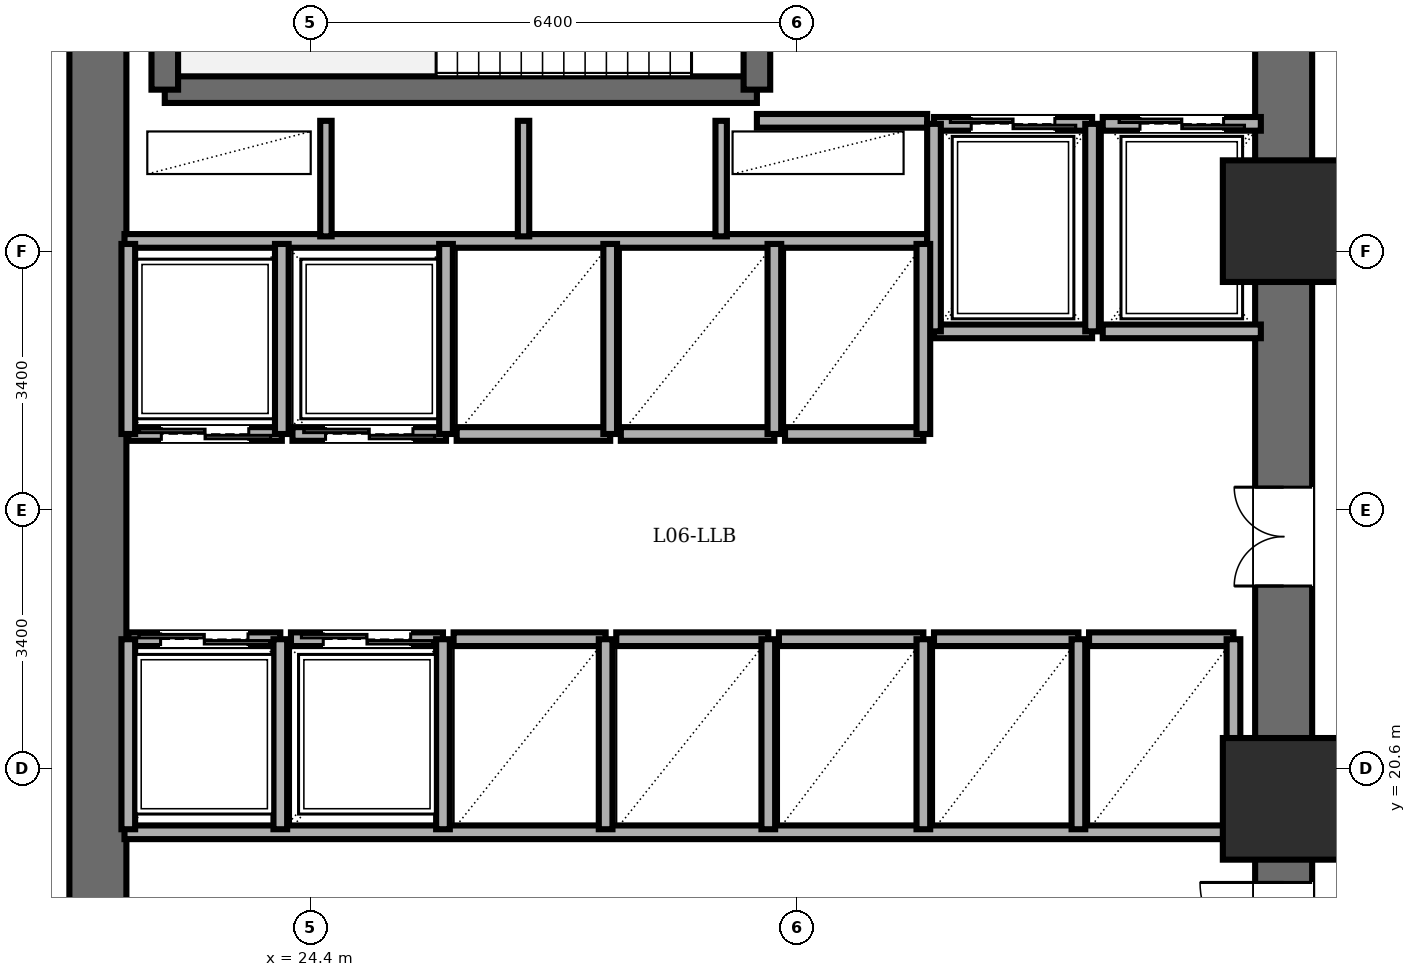
"""IFC4 building model, lengths in metres.
Left out: names, types, materials, properties, quantities, classifications, styles, units other than length and angle.
Written with IfcOpenShell. Run it as: python <this file> out.ifc"""

import sys

from ifc_helpers import new_model, si_unit, direction, frame, frame_2d, origin, origin_2d, place, context, subcontext, project, spatial, rectangle, extrude, element, fill, save


model = new_model("IFC4")
c1 = context("Model", 3, precision=1e-05, world=origin(), true_north=direction((0.0, 1.0)))
c2 = subcontext(c1, "Body", "Model", "MODEL_VIEW")
j1 = project(units=[si_unit("LENGTHUNIT", "METRE"), si_unit("PLANEANGLEUNIT", "RADIAN")], contexts=[c1])
p1 = place(None, origin())
s1 = spatial("IfcSite", under=j1, at=p1, CompositionType="ELEMENT")
p2 = place(p1, origin())
s2 = spatial("IfcBuilding", under=s1, at=p2, CompositionType="ELEMENT")
p3 = place(p2, frame((0.0, 0.0, 24.0)))
s3 = spatial("IfcBuildingStorey", under=s2, at=p3, CompositionType="ELEMENT", Elevation=24.0)
for number, where, z_axis, x_axis in (
    (1, (37.2, 20.2, 0.0), (0.0, 0.0, 1.0), (1.0, 0.0, 0.0)),
    (2, (37.2, 27.8, 0.0), (0.0, 0.0, 1.0), (1.0, 0.0, 0.0)),
):
    element("IfcColumn", number, at=place(p3, frame(where, z_axis=z_axis, x_axis=x_axis)), inside=s3, PredefinedType="COLUMN", context=c2, shape_type="SweptSolid", body=[
        extrude(rectangle(XDim=1.6, YDim=1.6, at=origin_2d()), origin(), (0.0, 0.0, 1.0), 4.8),
    ])
p4 = place(p3, frame((21.6, 14.4, 0.0), z_axis=(0.0, 0.0, 1.0), x_axis=(0.0, 1.0, 0.0)))
e3 = element("IfcWall", 3, at=p4, inside=s3, PredefinedType="SHEAR", context=c2, shape_type="SweptSolid", body=[
    extrude(rectangle(XDim=19.2, YDim=0.75, at=frame_2d((9.6, 0.0))), origin(), (0.0, 0.0, 1.0), 4.6),
])
p5 = place(p3, frame((37.2, 14.4, 0.0), z_axis=(0.0, 0.0, 1.0), x_axis=(0.0, 1.0, 0.0)))
e4 = element("IfcWall", 4, at=p5, inside=s3, PredefinedType="SHEAR", context=c2, shape_type="SweptSolid", body=[
    extrude(rectangle(XDim=19.2, YDim=0.75, at=frame_2d((9.6, 0.0))), origin(), (0.0, 0.0, 1.0), 4.6),
])
p6 = place(p5, frame((15.8, 0.0, 0.0)))
e5 = element("IfcOpeningElement", 5, at=p6, cuts=e4, PredefinedType="OPENING", context=c2, shape_type="SweptSolid", body=[
    extrude(rectangle(XDim=1.15, YDim=2.15, at=frame_2d((0.575, 1.075))), frame((0.0, 0.385, 0.0), z_axis=(0.0, -1.0, 0.0), x_axis=(1.0, 0.0, 0.0)), (0.0, 0.0, 1.0), 0.77),
])
p7 = place(p5, frame((3.6, 0.0, 0.0)))
e6 = element("IfcOpeningElement", 6, at=p7, cuts=e4, PredefinedType="OPENING", context=c2, shape_type="SweptSolid", body=[
    extrude(rectangle(XDim=1.1, YDim=2.15, at=frame_2d((0.55, 1.075))), frame((0.0, 0.385, 0.0), z_axis=(0.0, -1.0, 0.0), x_axis=(1.0, 0.0, 0.0)), (0.0, 0.0, 1.0), 0.77),
])
p8 = place(p5, frame((8.6, 0.0, 0.0)))
e7 = element("IfcOpeningElement", 7, at=p8, cuts=e4, PredefinedType="OPENING", context=c2, shape_type="SweptSolid", body=[
    extrude(rectangle(XDim=1.3, YDim=2.2, at=frame_2d((0.65, 1.1))), frame((0.0, 0.385, 0.0), z_axis=(0.0, -1.0, 0.0), x_axis=(1.0, 0.0, 0.0)), (0.0, 0.0, 1.0), 0.77),
])
p9 = place(p3, frame((22.48, 29.53, 0.0), z_axis=(0.0, 0.0, 1.0), x_axis=(1.0, 0.0, 0.0)))
e8 = element("IfcWall", 8, at=p9, inside=s3, PredefinedType="SOLIDWALL", context=c2, shape_type="SweptSolid", body=[
    extrude(rectangle(XDim=7.79, YDim=0.35, at=frame_2d((3.895, 0.0))), origin(), (0.0, 0.0, 1.0), 4.6),
])
p10 = place(p3, frame((22.48, 29.53, 0.0), z_axis=(0.0, 0.0, 1.0), x_axis=(0.0, 1.0, 0.0)))
e9 = element("IfcWall", 9, at=p10, inside=s3, PredefinedType="SOLIDWALL", context=c2, shape_type="SweptSolid", body=[
    extrude(rectangle(XDim=3.58, YDim=0.35, at=frame_2d((1.79, 0.0))), origin(), (0.0, 0.0, 1.0), 4.6),
])
p11 = place(p3, frame((30.27, 29.53, 0.0), z_axis=(0.0, 0.0, 1.0), x_axis=(0.0, 1.0, 0.0)))
e10 = element("IfcWall", 10, at=p11, inside=s3, PredefinedType="SOLIDWALL", context=c2, shape_type="SweptSolid", body=[
    extrude(rectangle(XDim=3.58, YDim=0.35, at=frame_2d((1.79, 0.0))), origin(), (0.0, 0.0, 1.0), 4.6),
])
p12 = place(p11, frame((1.25, 0.0, 0.0)))
e11 = element("IfcOpeningElement", 11, at=p12, cuts=e10, PredefinedType="OPENING", context=c2, shape_type="SweptSolid", body=[
    extrude(rectangle(XDim=1.1, YDim=2.15, at=frame_2d((0.55, 1.075))), frame((0.0, 0.185, 0.0), z_axis=(0.0, -1.0, 0.0), x_axis=(1.0, 0.0, 0.0)), (0.0, 0.0, 1.0), 0.37),
])
p13 = place(p3, frame((30.27, 29.12, 0.0), z_axis=(0.0, 0.0, 1.0), x_axis=(1.0, 0.0, 0.0)))
e12 = element("IfcWall", 12, at=p13, inside=s3, PredefinedType="PARTITIONING", context=c2, shape_type="SweptSolid", body=[
    extrude(rectangle(XDim=2.24, YDim=0.18, at=frame_2d((1.12, 0.0))), origin(), (0.0, 0.0, 1.0), 4.6),
])
p14 = place(p3, frame((21.95, 27.54, 0.0), z_axis=(0.0, 0.0, 1.0), x_axis=(1.0, 0.0, 0.0)))
e13 = element("IfcWall", 13, at=p14, inside=s3, PredefinedType="PARTITIONING", context=c2, shape_type="SweptSolid", body=[
    extrude(rectangle(XDim=10.56, YDim=0.18, at=frame_2d((5.28, 0.0))), origin(), (0.0, 0.0, 1.0), 4.6),
])
for number, where, z_axis, x_axis in (
    (14, (24.6, 27.6, 0.0), (0.0, 0.0, 1.0), (0.0, 1.0, 0.0)),
    (15, (27.2, 27.6, 0.0), (0.0, 0.0, 1.0), (0.0, 1.0, 0.0)),
    (16, (29.8, 27.6, 0.0), (0.0, 0.0, 1.0), (0.0, 1.0, 0.0)),
):
    element("IfcWall", number, at=place(p3, frame(where, z_axis=z_axis, x_axis=x_axis)), inside=s3, PredefinedType="PARTITIONING", context=c2, shape_type="SweptSolid", body=[
        extrude(rectangle(XDim=1.52, YDim=0.15, at=frame_2d((0.76, 0.0))), origin(), (0.0, 0.0, 1.0), 4.6),
    ])
p15 = place(p3, frame((21.95, 19.76, 0.0), z_axis=(0.0, 0.0, 1.0), x_axis=(1.0, 0.0, 0.0)))
e17 = element("IfcWall", 17, at=p15, inside=s3, PredefinedType="PARTITIONING", context=c2, shape_type="SweptSolid", body=[
    extrude(rectangle(XDim=14.87, YDim=0.18, at=frame_2d((7.435, 0.0))), origin(), (0.0, 0.0, 1.0), 4.6),
])
p16 = place(p3, frame((32.6, 29.08, 0.0), z_axis=(0.0, 0.0, 1.0), x_axis=(1.0, 0.0, 0.0)))
e18 = element("IfcWall", 18, at=p16, inside=s3, PredefinedType="PARTITIONING", context=c2, shape_type="SweptSolid", body=[
    extrude(rectangle(XDim=2.08, YDim=0.18, at=frame_2d((1.04, 0.0))), origin(), (0.0, 0.0, 1.0), 4.6),
])
p17 = place(p16, frame((0.49, 0.0, 0.0)))
e19 = element("IfcOpeningElement", 19, at=p17, cuts=e18, PredefinedType="OPENING", context=c2, shape_type="SweptSolid", body=[
    extrude(rectangle(XDim=1.1, YDim=2.2, at=frame_2d((0.55, 1.1))), frame((0.0, 0.1, 0.0), z_axis=(0.0, -1.0, 0.0), x_axis=(1.0, 0.0, 0.0)), (0.0, 0.0, 1.0), 0.2),
])
p18 = place(p3, frame((34.68, 26.35, 0.0), z_axis=(0.0, 0.0, 1.0), x_axis=(-1.0, 0.0, 0.0)))
e20 = element("IfcWall", 20, at=p18, inside=s3, PredefinedType="PARTITIONING", context=c2, shape_type="SweptSolid", body=[
    extrude(rectangle(XDim=2.08, YDim=0.18, at=frame_2d((1.04, 0.0))), origin(), (0.0, 0.0, 1.0), 4.6),
])
for number, where, z_axis, x_axis in (
    (21, (34.68, 26.35, 0.0), (0.0, 0.0, 1.0), (0.0, 1.0, 0.0)),
    (22, (32.6, 29.08, 0.0), (0.0, 0.0, 1.0), (0.0, -1.0, 0.0)),
):
    element("IfcWall", number, at=place(p3, frame(where, z_axis=z_axis, x_axis=x_axis)), inside=s3, PredefinedType="PARTITIONING", context=c2, shape_type="SweptSolid", body=[
        extrude(rectangle(XDim=2.73, YDim=0.18, at=frame_2d((1.365, 0.0))), origin(), (0.0, 0.0, 1.0), 4.6),
    ])
p19 = place(p3, frame((34.82, 29.08, 0.0), z_axis=(0.0, 0.0, 1.0), x_axis=(1.0, 0.0, 0.0)))
e23 = element("IfcWall", 23, at=p19, inside=s3, PredefinedType="PARTITIONING", context=c2, shape_type="SweptSolid", body=[
    extrude(rectangle(XDim=2.08, YDim=0.18, at=frame_2d((1.04, 0.0))), origin(), (0.0, 0.0, 1.0), 4.6),
])
p20 = place(p19, frame((0.49, 0.0, 0.0)))
e24 = element("IfcOpeningElement", 24, at=p20, cuts=e23, PredefinedType="OPENING", context=c2, shape_type="SweptSolid", body=[
    extrude(rectangle(XDim=1.1, YDim=2.2, at=frame_2d((0.55, 1.1))), frame((0.0, 0.1, 0.0), z_axis=(0.0, -1.0, 0.0), x_axis=(1.0, 0.0, 0.0)), (0.0, 0.0, 1.0), 0.2),
])
p21 = place(p3, frame((36.9, 26.35, 0.0), z_axis=(0.0, 0.0, 1.0), x_axis=(-1.0, 0.0, 0.0)))
e25 = element("IfcWall", 25, at=p21, inside=s3, PredefinedType="PARTITIONING", context=c2, shape_type="SweptSolid", body=[
    extrude(rectangle(XDim=2.08, YDim=0.18, at=frame_2d((1.04, 0.0))), origin(), (0.0, 0.0, 1.0), 4.6),
])
p22 = place(p3, frame((24.02, 25.0, 0.0), z_axis=(0.0, 0.0, 1.0), x_axis=(-1.0, 0.0, 0.0)))
e26 = element("IfcWall", 26, at=p22, inside=s3, PredefinedType="PARTITIONING", context=c2, shape_type="SweptSolid", body=[
    extrude(rectangle(XDim=2.02, YDim=0.18, at=frame_2d((1.01, 0.0))), origin(), (0.0, 0.0, 1.0), 4.6),
])
p23 = place(p22, frame((0.435, 0.0, 0.0)))
e27 = element("IfcOpeningElement", 27, at=p23, cuts=e26, PredefinedType="OPENING", context=c2, shape_type="SweptSolid", body=[
    extrude(rectangle(XDim=1.15, YDim=2.2, at=frame_2d((0.575, 1.1))), frame((0.0, 0.1, 0.0), z_axis=(0.0, -1.0, 0.0), x_axis=(1.0, 0.0, 0.0)), (0.0, 0.0, 1.0), 0.2),
])
for number, where, z_axis, x_axis in (
    (28, (24.02, 25.0, 0.0), (0.0, 0.0, 1.0), (0.0, 1.0, 0.0)),
    (29, (22.0, 27.5, 0.0), (0.0, 0.0, 1.0), (0.0, -1.0, 0.0)),
):
    element("IfcWall", number, at=place(p3, frame(where, z_axis=z_axis, x_axis=x_axis)), inside=s3, PredefinedType="PARTITIONING", context=c2, shape_type="SweptSolid", body=[
        extrude(rectangle(XDim=2.5, YDim=0.18, at=frame_2d((1.25, 0.0))), origin(), (0.0, 0.0, 1.0), 4.6),
    ])
p24 = place(p3, frame((26.18, 25.0, 0.0), z_axis=(0.0, 0.0, 1.0), x_axis=(-1.0, 0.0, 0.0)))
e30 = element("IfcWall", 30, at=p24, inside=s3, PredefinedType="PARTITIONING", context=c2, shape_type="SweptSolid", body=[
    extrude(rectangle(XDim=2.02, YDim=0.18, at=frame_2d((1.01, 0.0))), origin(), (0.0, 0.0, 1.0), 4.6),
])
p25 = place(p24, frame((0.435, 0.0, 0.0)))
e31 = element("IfcOpeningElement", 31, at=p25, cuts=e30, PredefinedType="OPENING", context=c2, shape_type="SweptSolid", body=[
    extrude(rectangle(XDim=1.15, YDim=2.2, at=frame_2d((0.575, 1.1))), frame((0.0, 0.1, 0.0), z_axis=(0.0, -1.0, 0.0), x_axis=(1.0, 0.0, 0.0)), (0.0, 0.0, 1.0), 0.2),
])
p26 = place(p3, frame((26.18, 25.0, 0.0), z_axis=(0.0, 0.0, 1.0), x_axis=(0.0, 1.0, 0.0)))
e32 = element("IfcWall", 32, at=p26, inside=s3, PredefinedType="PARTITIONING", context=c2, shape_type="SweptSolid", body=[
    extrude(rectangle(XDim=2.5, YDim=0.18, at=frame_2d((1.25, 0.0))), origin(), (0.0, 0.0, 1.0), 4.6),
])
p27 = place(p3, frame((22.0, 22.3, 0.0), z_axis=(0.0, 0.0, 1.0), x_axis=(1.0, 0.0, 0.0)))
e33 = element("IfcWall", 33, at=p27, inside=s3, PredefinedType="PARTITIONING", context=c2, shape_type="SweptSolid", body=[
    extrude(rectangle(XDim=2.0, YDim=0.18, at=frame_2d((1.0, 0.0))), origin(), (0.0, 0.0, 1.0), 4.6),
])
p28 = place(p27, frame((0.425, 0.0, 0.0)))
e34 = element("IfcOpeningElement", 34, at=p28, cuts=e33, PredefinedType="OPENING", context=c2, shape_type="SweptSolid", body=[
    extrude(rectangle(XDim=1.15, YDim=2.2, at=frame_2d((0.575, 1.1))), frame((0.0, 0.1, 0.0), z_axis=(0.0, -1.0, 0.0), x_axis=(1.0, 0.0, 0.0)), (0.0, 0.0, 1.0), 0.2),
])
for number, where, z_axis, x_axis in (
    (35, (24.0, 19.8, 0.0), (0.0, 0.0, 1.0), (0.0, 1.0, 0.0)),
    (36, (22.0, 22.3, 0.0), (0.0, 0.0, 1.0), (0.0, -1.0, 0.0)),
):
    element("IfcWall", number, at=place(p3, frame(where, z_axis=z_axis, x_axis=x_axis)), inside=s3, PredefinedType="PARTITIONING", context=c2, shape_type="SweptSolid", body=[
        extrude(rectangle(XDim=2.5, YDim=0.18, at=frame_2d((1.25, 0.0))), origin(), (0.0, 0.0, 1.0), 4.6),
    ])
p29 = place(p3, frame((24.14, 22.3, 0.0), z_axis=(0.0, 0.0, 1.0), x_axis=(1.0, 0.0, 0.0)))
e37 = element("IfcWall", 37, at=p29, inside=s3, PredefinedType="PARTITIONING", context=c2, shape_type="SweptSolid", body=[
    extrude(rectangle(XDim=2.0, YDim=0.18, at=frame_2d((1.0, 0.0))), origin(), (0.0, 0.0, 1.0), 4.6),
])
p30 = place(p29, frame((0.425, 0.0, 0.0)))
e38 = element("IfcOpeningElement", 38, at=p30, cuts=e37, PredefinedType="OPENING", context=c2, shape_type="SweptSolid", body=[
    extrude(rectangle(XDim=1.15, YDim=2.2, at=frame_2d((0.575, 1.1))), frame((0.0, 0.1, 0.0), z_axis=(0.0, -1.0, 0.0), x_axis=(1.0, 0.0, 0.0)), (0.0, 0.0, 1.0), 0.2),
])
p31 = place(p3, frame((26.14, 19.8, 0.0), z_axis=(0.0, 0.0, 1.0), x_axis=(0.0, 1.0, 0.0)))
e39 = element("IfcWall", 39, at=p31, inside=s3, PredefinedType="PARTITIONING", context=c2, shape_type="SweptSolid", body=[
    extrude(rectangle(XDim=2.5, YDim=0.18, at=frame_2d((1.25, 0.0))), origin(), (0.0, 0.0, 1.0), 4.6),
])
p32 = place(p3, frame((28.34, 25.0, 0.0), z_axis=(0.0, 0.0, 1.0), x_axis=(-1.0, 0.0, 0.0)))
e40 = element("IfcWall", 40, at=p32, inside=s3, PredefinedType="PARTITIONING", context=c2, shape_type="SweptSolid", body=[
    extrude(rectangle(XDim=2.02, YDim=0.18, at=frame_2d((1.01, 0.0))), origin(), (0.0, 0.0, 1.0), 4.6),
])
p33 = place(p3, frame((28.34, 25.0, 0.0), z_axis=(0.0, 0.0, 1.0), x_axis=(0.0, 1.0, 0.0)))
e41 = element("IfcWall", 41, at=p33, inside=s3, PredefinedType="PARTITIONING", context=c2, shape_type="SweptSolid", body=[
    extrude(rectangle(XDim=2.5, YDim=0.18, at=frame_2d((1.25, 0.0))), origin(), (0.0, 0.0, 1.0), 4.6),
])
p34 = place(p3, frame((30.5, 25.0, 0.0), z_axis=(0.0, 0.0, 1.0), x_axis=(-1.0, 0.0, 0.0)))
e42 = element("IfcWall", 42, at=p34, inside=s3, PredefinedType="PARTITIONING", context=c2, shape_type="SweptSolid", body=[
    extrude(rectangle(XDim=2.02, YDim=0.18, at=frame_2d((1.01, 0.0))), origin(), (0.0, 0.0, 1.0), 4.6),
])
p35 = place(p3, frame((30.5, 25.0, 0.0), z_axis=(0.0, 0.0, 1.0), x_axis=(0.0, 1.0, 0.0)))
e43 = element("IfcWall", 43, at=p35, inside=s3, PredefinedType="PARTITIONING", context=c2, shape_type="SweptSolid", body=[
    extrude(rectangle(XDim=2.5, YDim=0.18, at=frame_2d((1.25, 0.0))), origin(), (0.0, 0.0, 1.0), 4.6),
])
p36 = place(p3, frame((26.28, 22.3, 0.0), z_axis=(0.0, 0.0, 1.0), x_axis=(1.0, 0.0, 0.0)))
e44 = element("IfcWall", 44, at=p36, inside=s3, PredefinedType="PARTITIONING", context=c2, shape_type="SweptSolid", body=[
    extrude(rectangle(XDim=2.0, YDim=0.18, at=frame_2d((1.0, 0.0))), origin(), (0.0, 0.0, 1.0), 4.6),
])
p37 = place(p3, frame((28.28, 19.8, 0.0), z_axis=(0.0, 0.0, 1.0), x_axis=(0.0, 1.0, 0.0)))
e45 = element("IfcWall", 45, at=p37, inside=s3, PredefinedType="PARTITIONING", context=c2, shape_type="SweptSolid", body=[
    extrude(rectangle(XDim=2.5, YDim=0.18, at=frame_2d((1.25, 0.0))), origin(), (0.0, 0.0, 1.0), 4.6),
])
p38 = place(p3, frame((28.42, 22.3, 0.0), z_axis=(0.0, 0.0, 1.0), x_axis=(1.0, 0.0, 0.0)))
e46 = element("IfcWall", 46, at=p38, inside=s3, PredefinedType="PARTITIONING", context=c2, shape_type="SweptSolid", body=[
    extrude(rectangle(XDim=2.0, YDim=0.18, at=frame_2d((1.0, 0.0))), origin(), (0.0, 0.0, 1.0), 4.6),
])
p39 = place(p3, frame((30.42, 19.8, 0.0), z_axis=(0.0, 0.0, 1.0), x_axis=(0.0, 1.0, 0.0)))
e47 = element("IfcWall", 47, at=p39, inside=s3, PredefinedType="PARTITIONING", context=c2, shape_type="SweptSolid", body=[
    extrude(rectangle(XDim=2.5, YDim=0.18, at=frame_2d((1.25, 0.0))), origin(), (0.0, 0.0, 1.0), 4.6),
])
p40 = place(p3, frame((32.46, 25.0, 0.0), z_axis=(0.0, 0.0, 1.0), x_axis=(-1.0, 0.0, 0.0)))
e48 = element("IfcWall", 48, at=p40, inside=s3, PredefinedType="PARTITIONING", context=c2, shape_type="SweptSolid", body=[
    extrude(rectangle(XDim=1.82, YDim=0.18, at=frame_2d((0.91, 0.0))), origin(), (0.0, 0.0, 1.0), 4.6),
])
p41 = place(p3, frame((32.46, 25.0, 0.0), z_axis=(0.0, 0.0, 1.0), x_axis=(0.0, 1.0, 0.0)))
e49 = element("IfcWall", 49, at=p41, inside=s3, PredefinedType="PARTITIONING", context=c2, shape_type="SweptSolid", body=[
    extrude(rectangle(XDim=2.5, YDim=0.18, at=frame_2d((1.25, 0.0))), origin(), (0.0, 0.0, 1.0), 4.6),
])
p42 = place(p3, frame((30.56, 22.3, 0.0), z_axis=(0.0, 0.0, 1.0), x_axis=(1.0, 0.0, 0.0)))
e50 = element("IfcWall", 50, at=p42, inside=s3, PredefinedType="PARTITIONING", context=c2, shape_type="SweptSolid", body=[
    extrude(rectangle(XDim=1.9, YDim=0.18, at=frame_2d((0.95, 0.0))), origin(), (0.0, 0.0, 1.0), 4.6),
])
p43 = place(p3, frame((32.46, 19.8, 0.0), z_axis=(0.0, 0.0, 1.0), x_axis=(0.0, 1.0, 0.0)))
e51 = element("IfcWall", 51, at=p43, inside=s3, PredefinedType="PARTITIONING", context=c2, shape_type="SweptSolid", body=[
    extrude(rectangle(XDim=2.5, YDim=0.18, at=frame_2d((1.25, 0.0))), origin(), (0.0, 0.0, 1.0), 4.6),
])
p44 = place(p3, frame((32.6, 22.3, 0.0), z_axis=(0.0, 0.0, 1.0), x_axis=(1.0, 0.0, 0.0)))
e52 = element("IfcWall", 52, at=p44, inside=s3, PredefinedType="PARTITIONING", context=c2, shape_type="SweptSolid", body=[
    extrude(rectangle(XDim=1.9, YDim=0.18, at=frame_2d((0.95, 0.0))), origin(), (0.0, 0.0, 1.0), 4.6),
])
p45 = place(p3, frame((34.5, 19.8, 0.0), z_axis=(0.0, 0.0, 1.0), x_axis=(0.0, 1.0, 0.0)))
e53 = element("IfcWall", 53, at=p45, inside=s3, PredefinedType="PARTITIONING", context=c2, shape_type="SweptSolid", body=[
    extrude(rectangle(XDim=2.5, YDim=0.18, at=frame_2d((1.25, 0.0))), origin(), (0.0, 0.0, 1.0), 4.6),
])
p46 = place(p3, frame((34.64, 22.3, 0.0), z_axis=(0.0, 0.0, 1.0), x_axis=(1.0, 0.0, 0.0)))
e54 = element("IfcWall", 54, at=p46, inside=s3, PredefinedType="PARTITIONING", context=c2, shape_type="SweptSolid", body=[
    extrude(rectangle(XDim=1.9, YDim=0.18, at=frame_2d((0.95, 0.0))), origin(), (0.0, 0.0, 1.0), 4.6),
])
p47 = place(p3, frame((36.54, 19.8, 0.0), z_axis=(0.0, 0.0, 1.0), x_axis=(0.0, 1.0, 0.0)))
e55 = element("IfcWall", 55, at=p47, inside=s3, PredefinedType="PARTITIONING", context=c2, shape_type="SweptSolid", body=[
    extrude(rectangle(XDim=2.5, YDim=0.18, at=frame_2d((1.25, 0.0))), origin(), (0.0, 0.0, 1.0), 4.6),
])
p48 = place(p7, origin())
e56 = element("IfcDoor", 56, at=p48, inside=s3, OperationType="SINGLE_SWING_RIGHT", PredefinedType="DOOR", context=c2, shape_type="SweptSolid", body=[
    extrude(rectangle(XDim=1.1, YDim=2.15, at=frame_2d((0.55, 1.075))), frame((0.0, 0.025, 0.0), z_axis=(0.0, -1.0, 0.0), x_axis=(1.0, 0.0, 0.0)), (0.0, 0.0, 1.0), 0.05),
])
fill(e6, e56)
p49 = place(p17, origin())
e57 = element("IfcDoor", 57, at=p49, inside=s3, OperationType="DOUBLE_DOOR_SLIDING", PredefinedType="DOOR", context=c2, shape_type="SweptSolid", body=[
    extrude(rectangle(XDim=1.1, YDim=2.2, at=frame_2d((0.55, 1.1))), frame((0.0, 0.025, 0.0), z_axis=(0.0, -1.0, 0.0), x_axis=(1.0, 0.0, 0.0)), (0.0, 0.0, 1.0), 0.05),
])
fill(e19, e57)
p50 = place(p20, origin())
e58 = element("IfcDoor", 58, at=p50, inside=s3, OperationType="DOUBLE_DOOR_SLIDING", PredefinedType="DOOR", context=c2, shape_type="SweptSolid", body=[
    extrude(rectangle(XDim=1.1, YDim=2.2, at=frame_2d((0.55, 1.1))), frame((0.0, 0.025, 0.0), z_axis=(0.0, -1.0, 0.0), x_axis=(1.0, 0.0, 0.0)), (0.0, 0.0, 1.0), 0.05),
])
fill(e24, e58)
p51 = place(p23, origin())
e59 = element("IfcDoor", 59, at=p51, inside=s3, OperationType="DOUBLE_DOOR_SLIDING", PredefinedType="DOOR", context=c2, shape_type="SweptSolid", body=[
    extrude(rectangle(XDim=1.15, YDim=2.2, at=frame_2d((0.575, 1.1))), frame((0.0, 0.025, 0.0), z_axis=(0.0, -1.0, 0.0), x_axis=(1.0, 0.0, 0.0)), (0.0, 0.0, 1.0), 0.05),
])
fill(e27, e59)
p52 = place(p25, origin())
e60 = element("IfcDoor", 60, at=p52, inside=s3, OperationType="DOUBLE_DOOR_SLIDING", PredefinedType="DOOR", context=c2, shape_type="SweptSolid", body=[
    extrude(rectangle(XDim=1.15, YDim=2.2, at=frame_2d((0.575, 1.1))), frame((0.0, 0.025, 0.0), z_axis=(0.0, -1.0, 0.0), x_axis=(1.0, 0.0, 0.0)), (0.0, 0.0, 1.0), 0.05),
])
fill(e31, e60)
p53 = place(p28, origin())
e61 = element("IfcDoor", 61, at=p53, inside=s3, OperationType="DOUBLE_DOOR_SLIDING", PredefinedType="DOOR", context=c2, shape_type="SweptSolid", body=[
    extrude(rectangle(XDim=1.15, YDim=2.2, at=frame_2d((0.575, 1.1))), frame((0.0, 0.025, 0.0), z_axis=(0.0, -1.0, 0.0), x_axis=(1.0, 0.0, 0.0)), (0.0, 0.0, 1.0), 0.05),
])
fill(e34, e61)
p54 = place(p30, origin())
e62 = element("IfcDoor", 62, at=p54, inside=s3, OperationType="DOUBLE_DOOR_SLIDING", PredefinedType="DOOR", context=c2, shape_type="SweptSolid", body=[
    extrude(rectangle(XDim=1.15, YDim=2.2, at=frame_2d((0.575, 1.1))), frame((0.0, 0.025, 0.0), z_axis=(0.0, -1.0, 0.0), x_axis=(1.0, 0.0, 0.0)), (0.0, 0.0, 1.0), 0.05),
])
fill(e38, e62)
p55 = place(p8, origin())
e63 = element("IfcDoor", 63, at=p55, inside=s3, OperationType="DOUBLE_DOOR_SINGLE_SWING", PredefinedType="DOOR", context=c2, shape_type="SweptSolid", body=[
    extrude(rectangle(XDim=1.3, YDim=2.2, at=frame_2d((0.65, 1.1))), frame((0.0, 0.025, 0.0), z_axis=(0.0, -1.0, 0.0), x_axis=(1.0, 0.0, 0.0)), (0.0, 0.0, 1.0), 0.05),
])
fill(e7, e63)
save(model, sys.argv[1])
